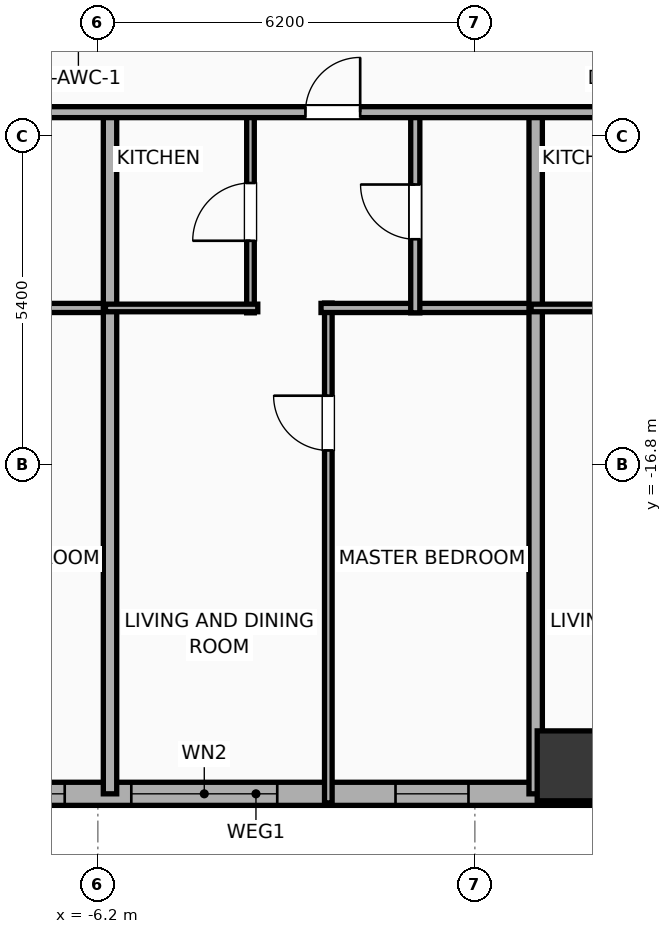
"""IFC4 building model, lengths in metres.
Left out: names, types, materials, properties, quantities, classifications, styles, units other than length and angle.
Written with IfcOpenShell. Run it as: python <this file> out.ifc"""

import sys

from ifc_helpers import new_model, si_unit, direction, frame, frame_2d, origin, origin_2d, place, context, subcontext, project, spatial, rectangle, hollow_rectangle, extrude, element, fill, save


model = new_model("IFC4")
c1 = context("Model", 3, precision=1e-05, world=origin(), true_north=direction((0.0, 1.0)))
c2 = subcontext(c1, "Body", "Model", "MODEL_VIEW")
j1 = project(units=[si_unit("LENGTHUNIT", "METRE"), si_unit("PLANEANGLEUNIT", "RADIAN")], contexts=[c1])
p1 = place(None, origin())
s1 = spatial("IfcSite", under=j1, at=p1, CompositionType="ELEMENT")
p2 = place(p1, origin())
s2 = spatial("IfcBuilding", under=s1, at=p2, CompositionType="ELEMENT")
p3 = place(p2, frame((0.0, 0.0, 65.0)))
s3 = spatial("IfcBuildingStorey", under=s2, at=p3, CompositionType="ELEMENT", Elevation=65.0)
p4 = place(p3, frame((1.6, -21.75, 0.0), z_axis=(0.0, 0.0, 1.0), x_axis=(1.0, 0.0, 0.0)))
e1 = element("IfcColumn", 1, at=p4, inside=s3, PredefinedType="COLUMN", context=c2, shape_type="SweptSolid", body=[
    extrude(hollow_rectangle(XDim=1.15, YDim=1.15, WallThickness=0.04, at=origin_2d()), origin(), (0.0, 0.0, 1.0), 3.9),
])
p5 = place(p3, frame((22.381, -22.21, 0.0), z_axis=(0.0, 0.0, 1.0), x_axis=(-1.0, 0.0, 0.0)))
e2 = element("IfcWall", 2, at=p5, inside=s3, PredefinedType="ELEMENTEDWALL", context=c2, shape_type="SweptSolid", body=[
    extrude(rectangle(XDim=51.963, YDim=0.38, at=frame_2d((25.981, 0.0))), origin(), (0.0, 0.0, 1.0), 3.65),
])
p6 = place(p5, frame((25.631, 0.0, 0.75)))
e3 = element("IfcOpeningElement", 3, at=p6, cuts=e2, PredefinedType="OPENING", context=c2, shape_type="SweptSolid", body=[
    extrude(rectangle(XDim=2.4, YDim=2.1, at=frame_2d((1.2, 1.05))), frame((0.0, 0.2, 0.0), z_axis=(0.0, -1.0, 0.0), x_axis=(1.0, 0.0, 0.0)), (0.0, 0.0, 1.0), 0.4),
])
p7 = place(p5, frame((42.952, 0.0, 0.75)))
e4 = element("IfcOpeningElement", 4, at=p7, cuts=e2, PredefinedType="OPENING", context=c2, shape_type="SweptSolid", body=[
    extrude(rectangle(XDim=2.4, YDim=2.1, at=frame_2d((1.2, 1.05))), frame((0.0, 0.2, 0.0), z_axis=(0.0, -1.0, 0.0), x_axis=(1.0, 0.0, 0.0)), (0.0, 0.0, 1.0), 0.4),
])
p8 = place(p5, frame((49.433, 0.0, 0.75)))
e5 = element("IfcOpeningElement", 5, at=p8, cuts=e2, PredefinedType="OPENING", context=c2, shape_type="SweptSolid", body=[
    extrude(rectangle(XDim=1.2, YDim=2.05, at=frame_2d((0.6, 1.025))), frame((0.0, 0.2, 0.0), z_axis=(0.0, -1.0, 0.0), x_axis=(1.0, 0.0, 0.0)), (0.0, 0.0, 1.0), 0.4),
])
p9 = place(p5, frame((46.695, 0.0, 0.75)))
e6 = element("IfcOpeningElement", 6, at=p9, cuts=e2, PredefinedType="OPENING", context=c2, shape_type="SweptSolid", body=[
    extrude(rectangle(XDim=1.2, YDim=2.05, at=frame_2d((0.6, 1.025))), frame((0.0, 0.2, 0.0), z_axis=(0.0, -1.0, 0.0), x_axis=(1.0, 0.0, 0.0)), (0.0, 0.0, 1.0), 0.4),
])
p10 = place(p5, frame((39.529, 0.0, 0.75)))
e7 = element("IfcOpeningElement", 7, at=p10, cuts=e2, PredefinedType="OPENING", context=c2, shape_type="SweptSolid", body=[
    extrude(rectangle(XDim=1.2, YDim=2.05, at=frame_2d((0.6, 1.025))), frame((0.0, 0.2, 0.0), z_axis=(0.0, -1.0, 0.0), x_axis=(1.0, 0.0, 0.0)), (0.0, 0.0, 1.0), 0.4),
])
p11 = place(p5, frame((36.486, 0.0, 0.75)))
e8 = element("IfcOpeningElement", 8, at=p11, cuts=e2, PredefinedType="OPENING", context=c2, shape_type="SweptSolid", body=[
    extrude(rectangle(XDim=1.2, YDim=2.05, at=frame_2d((0.6, 1.025))), frame((0.0, 0.2, 0.0), z_axis=(0.0, -1.0, 0.0), x_axis=(1.0, 0.0, 0.0)), (0.0, 0.0, 1.0), 0.4),
])
p12 = place(p5, frame((32.986, 0.0, 0.75)))
e9 = element("IfcOpeningElement", 9, at=p12, cuts=e2, PredefinedType="OPENING", context=c2, shape_type="SweptSolid", body=[
    extrude(rectangle(XDim=1.2, YDim=2.05, at=frame_2d((0.6, 1.025))), frame((0.0, 0.2, 0.0), z_axis=(0.0, -1.0, 0.0), x_axis=(1.0, 0.0, 0.0)), (0.0, 0.0, 1.0), 0.4),
])
p13 = place(p5, frame((29.126, 0.0, 0.75)))
e10 = element("IfcOpeningElement", 10, at=p13, cuts=e2, PredefinedType="OPENING", context=c2, shape_type="SweptSolid", body=[
    extrude(rectangle(XDim=1.2, YDim=2.05, at=frame_2d((0.6, 1.025))), frame((0.0, 0.2, 0.0), z_axis=(0.0, -1.0, 0.0), x_axis=(1.0, 0.0, 0.0)), (0.0, 0.0, 1.0), 0.4),
])
p14 = place(p5, frame((22.486, 0.0, 0.75)))
e11 = element("IfcOpeningElement", 11, at=p14, cuts=e2, PredefinedType="OPENING", context=c2, shape_type="SweptSolid", body=[
    extrude(rectangle(XDim=1.2, YDim=2.05, at=frame_2d((0.6, 1.025))), frame((0.0, 0.2, 0.0), z_axis=(0.0, -1.0, 0.0), x_axis=(1.0, 0.0, 0.0)), (0.0, 0.0, 1.0), 0.4),
])
p15 = place(p5, frame((18.746, 0.0, 0.75)))
e12 = element("IfcOpeningElement", 12, at=p15, cuts=e2, PredefinedType="OPENING", context=c2, shape_type="SweptSolid", body=[
    extrude(rectangle(XDim=1.2, YDim=2.05, at=frame_2d((0.6, 1.025))), frame((0.0, 0.2, 0.0), z_axis=(0.0, -1.0, 0.0), x_axis=(1.0, 0.0, 0.0)), (0.0, 0.0, 1.0), 0.4),
])
p16 = place(p5, frame((15.486, 0.0, 0.75)))
e13 = element("IfcOpeningElement", 13, at=p16, cuts=e2, PredefinedType="OPENING", context=c2, shape_type="SweptSolid", body=[
    extrude(rectangle(XDim=1.2, YDim=2.05, at=frame_2d((0.6, 1.025))), frame((0.0, 0.2, 0.0), z_axis=(0.0, -1.0, 0.0), x_axis=(1.0, 0.0, 0.0)), (0.0, 0.0, 1.0), 0.4),
])
p17 = place(p5, frame((11.986, 0.0, 0.75)))
e14 = element("IfcOpeningElement", 14, at=p17, cuts=e2, PredefinedType="OPENING", context=c2, shape_type="SweptSolid", body=[
    extrude(rectangle(XDim=1.2, YDim=2.05, at=frame_2d((0.6, 1.025))), frame((0.0, 0.2, 0.0), z_axis=(0.0, -1.0, 0.0), x_axis=(1.0, 0.0, 0.0)), (0.0, 0.0, 1.0), 0.4),
])
p18 = place(p5, frame((8.366, 0.0, 0.75)))
e15 = element("IfcOpeningElement", 15, at=p18, cuts=e2, PredefinedType="OPENING", context=c2, shape_type="SweptSolid", body=[
    extrude(rectangle(XDim=1.2, YDim=2.05, at=frame_2d((0.6, 1.025))), frame((0.0, 0.2, 0.0), z_axis=(0.0, -1.0, 0.0), x_axis=(1.0, 0.0, 0.0)), (0.0, 0.0, 1.0), 0.4),
])
p19 = place(p5, frame((5.082, 0.0, 0.75)))
e16 = element("IfcOpeningElement", 16, at=p19, cuts=e2, PredefinedType="OPENING", context=c2, shape_type="SweptSolid", body=[
    extrude(rectangle(XDim=1.2, YDim=2.05, at=frame_2d((0.6, 1.025))), frame((0.0, 0.2, 0.0), z_axis=(0.0, -1.0, 0.0), x_axis=(1.0, 0.0, 0.0)), (0.0, 0.0, 1.0), 0.4),
])
p20 = place(p5, frame((2.277, 0.0, 0.75)))
e17 = element("IfcOpeningElement", 17, at=p20, cuts=e2, PredefinedType="OPENING", context=c2, shape_type="SweptSolid", body=[
    extrude(rectangle(XDim=1.2, YDim=2.05, at=frame_2d((0.6, 1.025))), frame((0.0, 0.2, 0.0), z_axis=(0.0, -1.0, 0.0), x_axis=(1.0, 0.0, 0.0)), (0.0, 0.0, 1.0), 0.4),
])
p21 = place(p5, frame((1.071, 0.0, 0.75)))
e18 = element("IfcOpeningElement", 18, at=p21, cuts=e2, PredefinedType="OPENING", context=c2, shape_type="SweptSolid", body=[
    extrude(rectangle(XDim=0.52, YDim=2.05, at=frame_2d((0.26, 1.025))), frame((0.0, 0.2, 0.0), z_axis=(0.0, -1.0, 0.0), x_axis=(1.0, 0.0, 0.0)), (0.0, 0.0, 1.0), 0.4),
])
p22 = place(p3, frame((-9.53, -14.22, 0.0), z_axis=(0.0, 0.0, 1.0), x_axis=(1.0, 0.0, 0.0)))
e19 = element("IfcWall", 19, at=p22, inside=s3, PredefinedType="PLUMBINGWALL", context=c2, shape_type="SweptSolid", body=[
    extrude(rectangle(XDim=3.605, YDim=0.15, at=frame_2d((1.802, 0.0))), origin(), (0.0, 0.0, 1.0), 3.65),
])
p23 = place(p3, frame((-6.0, -22.21, 0.0), z_axis=(0.0, 0.0, 1.0), x_axis=(0.0, 1.0, 0.0)))
e20 = element("IfcWall", 20, at=p23, inside=s3, PredefinedType="PARTITIONING", context=c2, shape_type="SweptSolid", body=[
    extrude(rectangle(XDim=11.29, YDim=0.22, at=frame_2d((5.645, 0.0))), origin(), (0.0, 0.0, 1.0), 3.65),
])
p24 = place(p3, frame((-2.41, -22.36, 0.0), z_axis=(0.0, 0.0, 1.0), x_axis=(0.0, 1.0, 0.0)))
e21 = element("IfcWall", 21, at=p24, inside=s3, PredefinedType="PARTITIONING", context=c2, shape_type="SweptSolid", body=[
    extrude(rectangle(XDim=8.22, YDim=0.125, at=frame_2d((4.11, 0.0))), origin(), (0.0, 0.0, 1.0), 3.65),
])
p25 = place(p24, frame((5.797, 0.0, 0.0)))
e22 = element("IfcOpeningElement", 22, at=p25, cuts=e21, PredefinedType="OPENING", context=c2, shape_type="SweptSolid", body=[
    extrude(rectangle(XDim=0.9, YDim=2.05, at=frame_2d((0.45, 1.025))), frame((0.0, 0.073, 0.0), z_axis=(0.0, -1.0, 0.0), x_axis=(1.0, 0.0, 0.0)), (0.0, 0.0, 1.0), 0.145),
])
p26 = place(p3, frame((-2.53, -14.22, 0.0), z_axis=(0.0, 0.0, 1.0), x_axis=(1.0, 0.0, 0.0)))
e23 = element("IfcWall", 23, at=p26, inside=s3, PredefinedType="PLUMBINGWALL", context=c2, shape_type="SweptSolid", body=[
    extrude(rectangle(XDim=3.605, YDim=0.15, at=frame_2d((1.802, 0.0))), origin(), (0.0, 0.0, 1.0), 3.65),
])
p27 = place(p3, frame((-3.69, -14.3, 0.0), z_axis=(0.0, 0.0, 1.0), x_axis=(0.0, 1.0, 0.0)))
e24 = element("IfcWall", 24, at=p27, inside=s3, PredefinedType="PARTITIONING", context=c2, shape_type="SweptSolid", body=[
    extrude(rectangle(XDim=3.32, YDim=0.125, at=frame_2d((1.66, 0.0))), origin(), (0.0, 0.0, 1.0), 3.65),
])
p28 = place(p27, frame((1.185, 0.0, 0.0)))
e25 = element("IfcOpeningElement", 25, at=p28, cuts=e24, PredefinedType="OPENING", context=c2, shape_type="SweptSolid", body=[
    extrude(rectangle(XDim=0.95, YDim=2.05, at=frame_2d((0.475, 1.025))), frame((0.0, 0.073, 0.0), z_axis=(0.0, -1.0, 0.0), x_axis=(1.0, 0.0, 0.0)), (0.0, 0.0, 1.0), 0.145),
])
p29 = place(p3, frame((-6.075, -14.22, 0.0), z_axis=(0.0, 0.0, 1.0), x_axis=(1.0, 0.0, 0.0)))
e26 = element("IfcWall", 26, at=p29, inside=s3, PredefinedType="PARTITIONING", context=c2, shape_type="SweptSolid", body=[
    extrude(rectangle(XDim=2.505, YDim=0.125, at=frame_2d((1.252, 0.0))), origin(), (0.0, 0.0, 1.0), 3.65),
])
p30 = place(p3, frame((-0.98, -14.3, 0.0), z_axis=(0.0, 0.0, 1.0), x_axis=(0.0, 1.0, 0.0)))
e27 = element("IfcWall", 27, at=p30, inside=s3, PredefinedType="PLUMBINGWALL", context=c2, shape_type="SweptSolid", body=[
    extrude(rectangle(XDim=3.32, YDim=0.15, at=frame_2d((1.66, 0.0))), origin(), (0.0, 0.0, 1.0), 3.65),
])
p31 = place(p30, frame((1.21, 0.0, 0.0)))
e28 = element("IfcOpeningElement", 28, at=p31, cuts=e27, PredefinedType="OPENING", context=c2, shape_type="SweptSolid", body=[
    extrude(rectangle(XDim=0.9, YDim=2.05, at=frame_2d((0.45, 1.025))), frame((0.0, 0.085, 0.0), z_axis=(0.0, -1.0, 0.0), x_axis=(1.0, 0.0, 0.0)), (0.0, 0.0, 1.0), 0.17),
])
p32 = place(p3, frame((1.0, -22.21, 0.0), z_axis=(0.0, 0.0, 1.0), x_axis=(0.0, 1.0, 0.0)))
e29 = element("IfcWall", 29, at=p32, inside=s3, PredefinedType="PARTITIONING", context=c2, shape_type="SweptSolid", body=[
    extrude(rectangle(XDim=11.29, YDim=0.22, at=frame_2d((5.645, 0.0))), origin(), (0.0, 0.0, 1.0), 3.65),
])
p33 = place(p3, frame((0.925, -14.22, 0.0), z_axis=(0.0, 0.0, 1.0), x_axis=(1.0, 0.0, 0.0)))
e30 = element("IfcWall", 30, at=p33, inside=s3, PredefinedType="PARTITIONING", context=c2, shape_type="SweptSolid", body=[
    extrude(rectangle(XDim=2.505, YDim=0.125, at=frame_2d((1.252, 0.0))), origin(), (0.0, 0.0, 1.0), 3.65),
])
p34 = place(p3, frame((-33.41, -11.0, 0.0), z_axis=(0.0, 0.0, 1.0), x_axis=(1.0, 0.0, 0.0)))
e31 = element("IfcWall", 31, at=p34, inside=s3, PredefinedType="PARTITIONING", context=c2, shape_type="SweptSolid", body=[
    extrude(rectangle(XDim=59.62, YDim=0.18, at=frame_2d((29.81, 0.0))), origin(), (0.0, 0.0, 1.0), 3.65),
])
p35 = place(p34, frame((3.08, 0.0, 0.0)))
e32 = element("IfcOpeningElement", 32, at=p35, cuts=e31, PredefinedType="OPENING", context=c2, shape_type="SweptSolid", body=[
    extrude(rectangle(XDim=0.9, YDim=2.05, at=frame_2d((0.45, 1.025))), frame((0.0, 0.1, 0.0), z_axis=(0.0, -1.0, 0.0), x_axis=(1.0, 0.0, 0.0)), (0.0, 0.0, 1.0), 0.2),
])
p36 = place(p34, frame((9.918, 0.0, 0.0)))
e33 = element("IfcOpeningElement", 33, at=p36, cuts=e31, PredefinedType="OPENING", context=c2, shape_type="SweptSolid", body=[
    extrude(rectangle(XDim=0.9, YDim=2.05, at=frame_2d((0.45, 1.025))), frame((0.0, 0.1, 0.0), z_axis=(0.0, -1.0, 0.0), x_axis=(1.0, 0.0, 0.0)), (0.0, 0.0, 1.0), 0.2),
])
p37 = place(p34, frame((16.721, 0.0, 0.0)))
e34 = element("IfcOpeningElement", 34, at=p37, cuts=e31, PredefinedType="OPENING", context=c2, shape_type="SweptSolid", body=[
    extrude(rectangle(XDim=0.9, YDim=2.05, at=frame_2d((0.45, 1.025))), frame((0.0, 0.1, 0.0), z_axis=(0.0, -1.0, 0.0), x_axis=(1.0, 0.0, 0.0)), (0.0, 0.0, 1.0), 0.2),
])
p38 = place(p34, frame((23.625, 0.0, 0.0)))
e35 = element("IfcOpeningElement", 35, at=p38, cuts=e31, PredefinedType="OPENING", context=c2, shape_type="SweptSolid", body=[
    extrude(rectangle(XDim=0.9, YDim=2.05, at=frame_2d((0.45, 1.025))), frame((0.0, 0.1, 0.0), z_axis=(0.0, -1.0, 0.0), x_axis=(1.0, 0.0, 0.0)), (0.0, 0.0, 1.0), 0.2),
])
p39 = place(p34, frame((30.624, 0.0, 0.0)))
e36 = element("IfcOpeningElement", 36, at=p39, cuts=e31, PredefinedType="OPENING", context=c2, shape_type="SweptSolid", body=[
    extrude(rectangle(XDim=0.9, YDim=2.05, at=frame_2d((0.45, 1.025))), frame((0.0, 0.1, 0.0), z_axis=(0.0, -1.0, 0.0), x_axis=(1.0, 0.0, 0.0)), (0.0, 0.0, 1.0), 0.2),
])
p40 = place(p34, frame((37.623, 0.0, 0.0)))
e37 = element("IfcOpeningElement", 37, at=p40, cuts=e31, PredefinedType="OPENING", context=c2, shape_type="SweptSolid", body=[
    extrude(rectangle(XDim=0.9, YDim=2.05, at=frame_2d((0.45, 1.025))), frame((0.0, 0.1, 0.0), z_axis=(0.0, -1.0, 0.0), x_axis=(1.0, 0.0, 0.0)), (0.0, 0.0, 1.0), 0.2),
])
p41 = place(p34, frame((44.623, 0.0, 0.0)))
e38 = element("IfcOpeningElement", 38, at=p41, cuts=e31, PredefinedType="OPENING", context=c2, shape_type="SweptSolid", body=[
    extrude(rectangle(XDim=0.9, YDim=2.05, at=frame_2d((0.45, 1.025))), frame((0.0, 0.1, 0.0), z_axis=(0.0, -1.0, 0.0), x_axis=(1.0, 0.0, 0.0)), (0.0, 0.0, 1.0), 0.2),
])
p42 = place(p34, frame((49.565, 0.0, 0.0)))
e39 = element("IfcOpeningElement", 39, at=p42, cuts=e31, PredefinedType="OPENING", context=c2, shape_type="SweptSolid", body=[
    extrude(rectangle(XDim=1.15, YDim=2.05, at=frame_2d((0.575, 1.025))), frame((0.0, 0.1, 0.0), z_axis=(0.0, -1.0, 0.0), x_axis=(1.0, 0.0, 0.0)), (0.0, 0.0, 1.0), 0.2),
])
p43 = place(p34, frame((56.583, 0.0, 0.0)))
e40 = element("IfcOpeningElement", 40, at=p43, cuts=e31, PredefinedType="OPENING", context=c2, shape_type="SweptSolid", body=[
    extrude(rectangle(XDim=0.9, YDim=2.05, at=frame_2d((0.45, 1.025))), frame((0.0, 0.1, 0.0), z_axis=(0.0, -1.0, 0.0), x_axis=(1.0, 0.0, 0.0)), (0.0, 0.0, 1.0), 0.2),
])
p44 = place(p6, origin())
e41 = element("IfcWindow", 41, at=p44, inside=s3, PartitioningType="SINGLE_PANEL", PredefinedType="WINDOW", context=c2, shape_type="SweptSolid", body=[
    extrude(rectangle(XDim=2.4, YDim=2.1, at=frame_2d((1.2, 1.05))), frame((0.0, 0.03, 0.0), z_axis=(0.0, -1.0, 0.0), x_axis=(1.0, 0.0, 0.0)), (0.0, 0.0, 1.0), 0.06),
])
fill(e3, e41)
p45 = place(p13, origin())
e42 = element("IfcWindow", 42, at=p45, inside=s3, PartitioningType="SINGLE_PANEL", PredefinedType="WINDOW", context=c2, shape_type="SweptSolid", body=[
    extrude(rectangle(XDim=1.2, YDim=2.05, at=frame_2d((0.6, 1.025))), frame((0.0, 0.03, 0.0), z_axis=(0.0, -1.0, 0.0), x_axis=(1.0, 0.0, 0.0)), (0.0, 0.0, 1.0), 0.06),
])
fill(e10, e42)
p46 = place(p14, origin())
e43 = element("IfcWindow", 43, at=p46, inside=s3, PartitioningType="SINGLE_PANEL", PredefinedType="WINDOW", context=c2, shape_type="SweptSolid", body=[
    extrude(rectangle(XDim=1.2, YDim=2.05, at=frame_2d((0.6, 1.025))), frame((0.0, 0.03, 0.0), z_axis=(0.0, -1.0, 0.0), x_axis=(1.0, 0.0, 0.0)), (0.0, 0.0, 1.0), 0.06),
])
fill(e11, e43)
p47 = place(p25, origin())
e44 = element("IfcDoor", 44, at=p47, inside=s3, OperationType="SINGLE_SWING_RIGHT", PredefinedType="DOOR", context=c2, shape_type="SweptSolid", body=[
    extrude(rectangle(XDim=0.9, YDim=2.05, at=frame_2d((0.45, 1.025))), frame((0.0, 0.025, 0.0), z_axis=(0.0, -1.0, 0.0), x_axis=(1.0, 0.0, 0.0)), (0.0, 0.0, 1.0), 0.05),
])
fill(e22, e44)
p48 = place(p28, origin())
e45 = element("IfcDoor", 45, at=p48, inside=s3, OperationType="SINGLE_SWING_LEFT", PredefinedType="DOOR", context=c2, shape_type="SweptSolid", body=[
    extrude(rectangle(XDim=0.95, YDim=2.05, at=frame_2d((0.475, 1.025))), frame((0.0, 0.025, 0.0), z_axis=(0.0, -1.0, 0.0), x_axis=(1.0, 0.0, 0.0)), (0.0, 0.0, 1.0), 0.05),
])
fill(e25, e45)
p49 = place(p31, origin())
e46 = element("IfcDoor", 46, at=p49, inside=s3, OperationType="SINGLE_SWING_RIGHT", PredefinedType="DOOR", context=c2, shape_type="SweptSolid", body=[
    extrude(rectangle(XDim=0.9, YDim=2.05, at=frame_2d((0.45, 1.025))), frame((0.0, 0.025, 0.0), z_axis=(0.0, -1.0, 0.0), x_axis=(1.0, 0.0, 0.0)), (0.0, 0.0, 1.0), 0.05),
])
fill(e28, e46)
p50 = place(p39, origin())
e47 = element("IfcDoor", 47, at=p50, inside=s3, OperationType="SINGLE_SWING_RIGHT", PredefinedType="DOOR", context=c2, shape_type="SweptSolid", body=[
    extrude(rectangle(XDim=0.9, YDim=2.05, at=frame_2d((0.45, 1.025))), frame((0.0, 0.025, 0.0), z_axis=(0.0, -1.0, 0.0), x_axis=(1.0, 0.0, 0.0)), (0.0, 0.0, 1.0), 0.05),
])
fill(e36, e47)
save(model, sys.argv[1])
